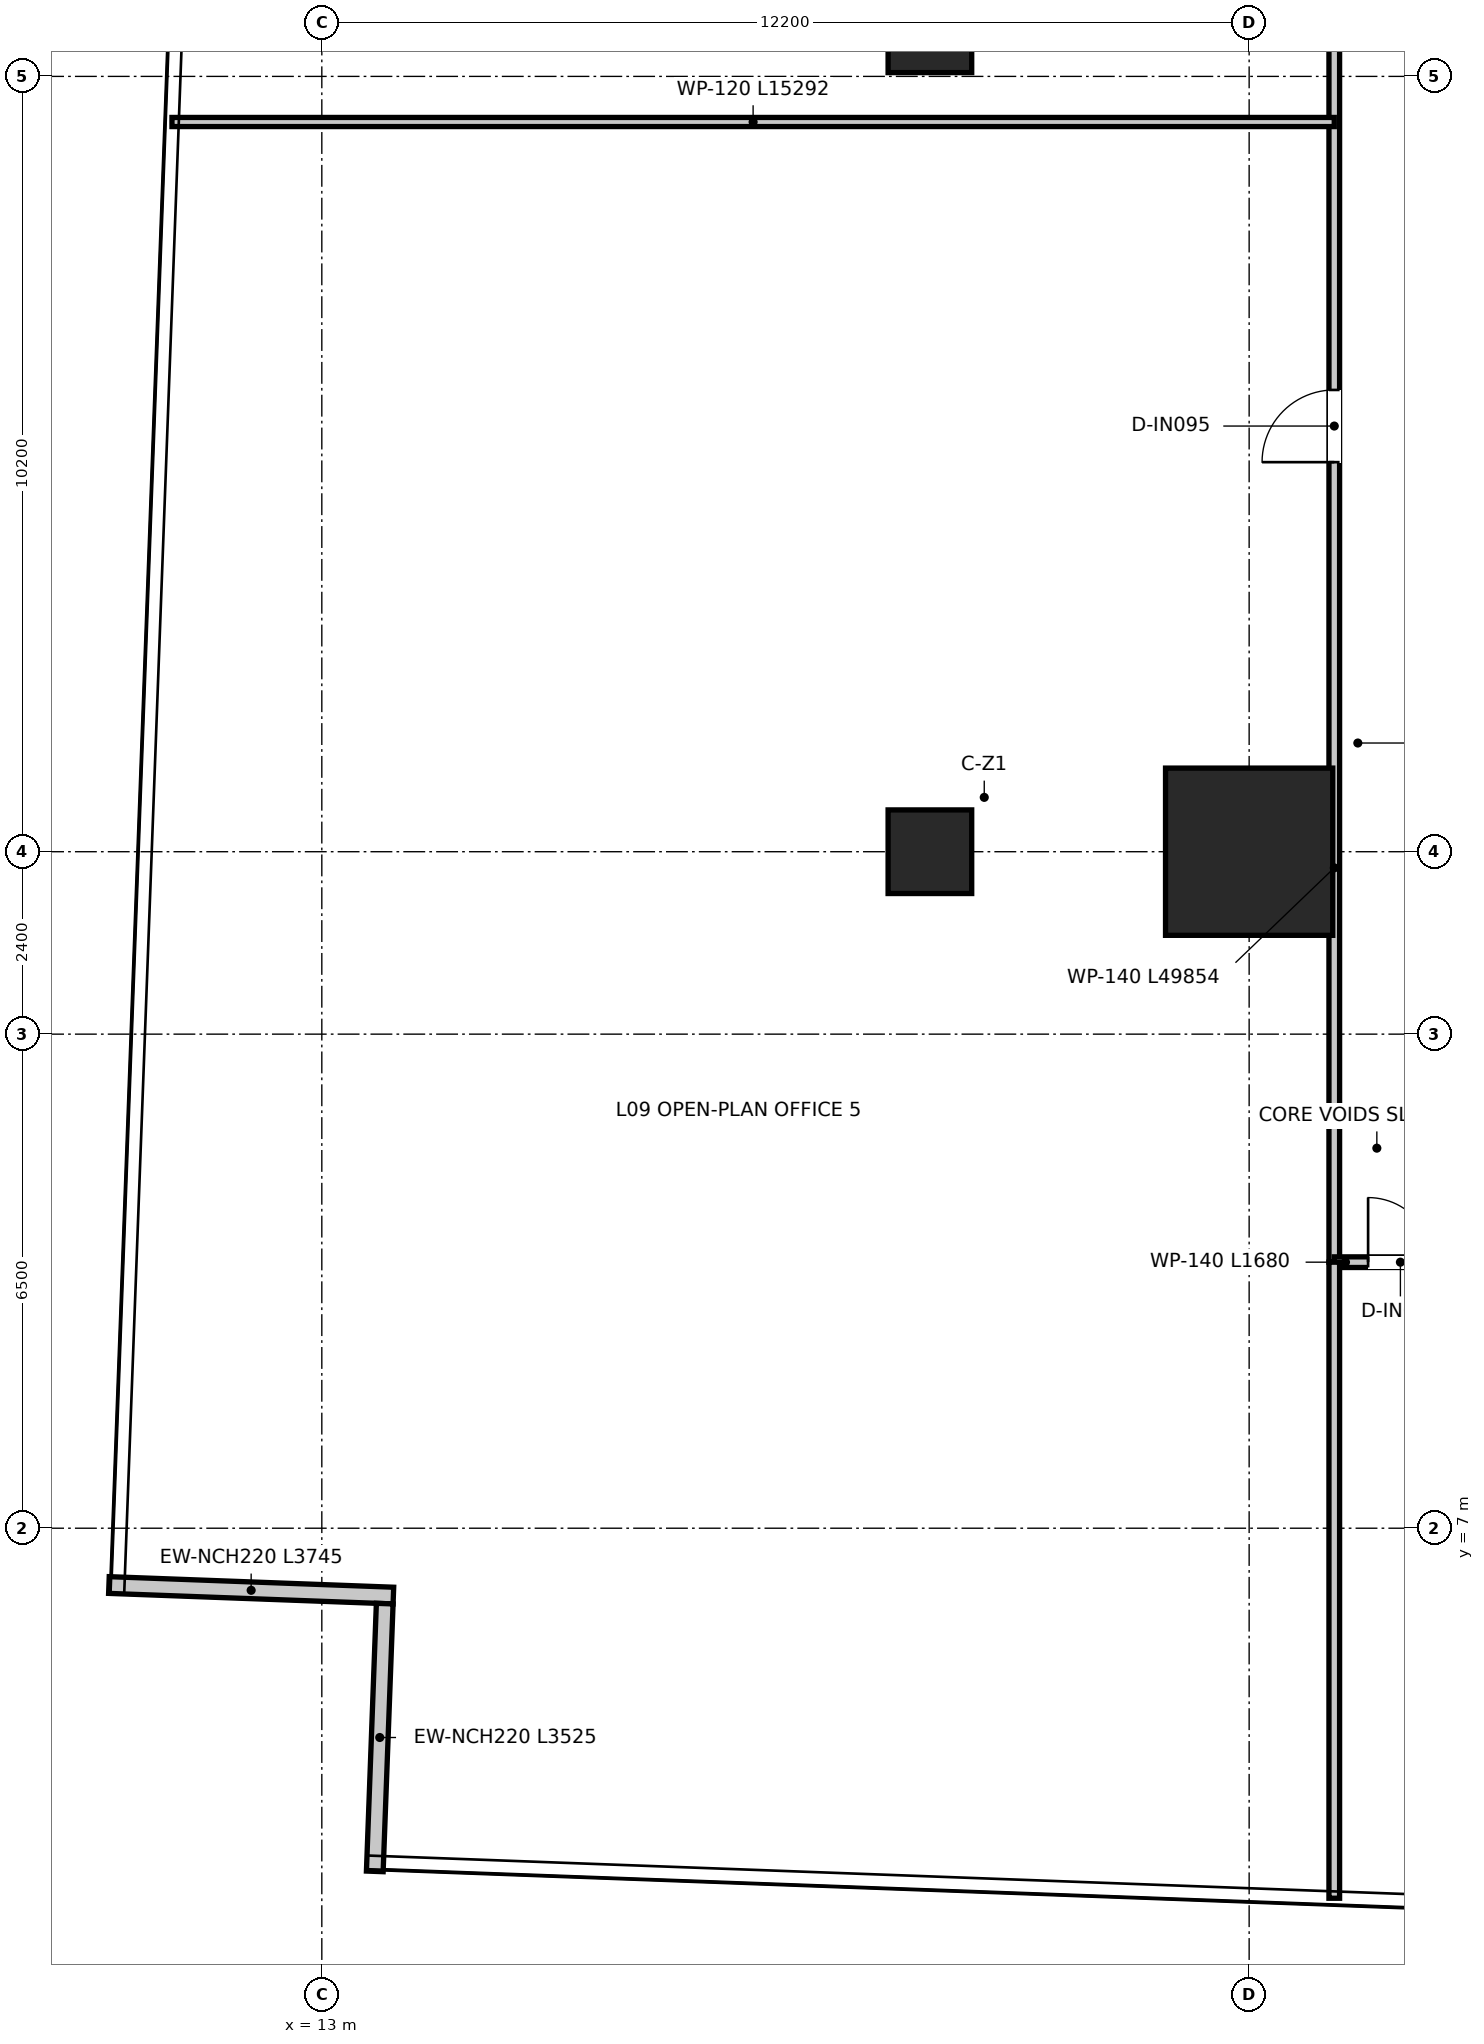
"""IFC4 building model, lengths in metres.
Left out: names, types, materials, properties, quantities, classifications, styles, units other than length and angle.
Written with IfcOpenShell. Run it as: python <this file> out.ifc"""

import sys

from ifc_helpers import new_model, si_unit, direction, frame, frame_2d, origin, origin_2d, place, context, subcontext, project, spatial, rectangle, extrude, source, transform, mapped, element, fill, save


model = new_model("IFC4")
c1 = context("Model", 3, precision=1e-05, world=origin(), true_north=direction((0.0, 1.0)))
c2 = subcontext(c1, "Body", "Model", "MODEL_VIEW")
j1 = project(units=[si_unit("LENGTHUNIT", "METRE"), si_unit("PLANEANGLEUNIT", "RADIAN")], contexts=[c1])
p1 = place(None, origin())
s1 = spatial("IfcSite", under=j1, at=p1, CompositionType="ELEMENT")
p2 = place(p1, origin())
s2 = spatial("IfcBuilding", under=s1, at=p2, CompositionType="ELEMENT")
p3 = place(p2, frame((0.0, 0.0, 40.8)))
s3 = spatial("IfcBuildingStorey", under=s2, at=p3, CompositionType="ELEMENT", Elevation=40.8)
m1 = source(origin(), c2, "Body", "SweptSolid", [
    extrude(rectangle(XDim=2.2, YDim=2.2, at=origin_2d()), origin(), (0.0, 0.0, 1.0), 3.95),
])
p4 = place(p3, frame((25.2, 15.9, 0.0), z_axis=(0.0, 0.0, 1.0), x_axis=(1.0, 0.0, 0.0)))
e1 = element("IfcColumn", 1, at=p4, inside=s3, PredefinedType="USERDEFINED", context=c2, shape_type="MappedRepresentation", body=[
    mapped(m1, transform((0.0, 0.0, 0.0), x_axis=(1.0, 0.0, 0.0), y_axis=(0.0, 1.0, 0.0), z_axis=(0.0, 0.0, 1.0), scale=1.0)),
])
m2 = source(origin(), c2, "Body", "SweptSolid", [
    extrude(rectangle(XDim=1.1, YDim=1.1, at=origin_2d()), origin(), (0.0, 0.0, 1.0), 3.95),
])
for number, where, z_axis, x_axis in (
    (2, (21.0, 15.9, 0.0), (0.0, 0.0, 1.0), (1.0, 0.0, 0.0)),
    (3, (21.0, 26.7, 0.0), (0.0, 0.0, 1.0), (1.0, 0.0, 0.0)),
):
    element("IfcColumn", number, at=place(p3, frame(where, z_axis=z_axis, x_axis=x_axis)), inside=s3, PredefinedType="COLUMN", context=c2, shape_type="MappedRepresentation", body=[
        mapped(m2, transform((0.0, 0.0, 0.0), x_axis=(1.0, 0.0, 0.0), y_axis=(0.0, 1.0, 0.0), z_axis=(0.0, 0.0, 1.0), scale=1.0)),
    ])
p5 = place(p3, frame((10.199, 6.253, 0.0), z_axis=(0.0, 0.0, 1.0), x_axis=(0.999311794114, -0.037093640215, 0.0)))
e4 = element("IfcWall", 4, at=p5, inside=s3, PredefinedType="ELEMENTEDWALL", context=c2, shape_type="SweptSolid", body=[
    extrude(rectangle(XDim=3.745, YDim=0.22, at=frame_2d((1.873, 0.0))), origin(), (0.0, 0.0, 1.0), 3.67),
])
p6 = place(p3, frame((13.827, 6.008, 0.0), z_axis=(0.0, 0.0, 1.0), x_axis=(-0.03705521019, -0.999313219865, 0.0)))
e5 = element("IfcWall", 5, at=p6, inside=s3, PredefinedType="ELEMENTEDWALL", context=c2, shape_type="SweptSolid", body=[
    extrude(rectangle(XDim=3.525, YDim=0.22, at=frame_2d((1.762, 0.0))), origin(), (0.0, 0.0, 1.0), 3.67),
])
p7 = place(p3, frame((26.32, 10.5, 0.0), z_axis=(0.0, 0.0, 1.0), x_axis=(0.0, 1.0, 0.0)))
e6 = element("IfcWall", 6, at=p7, inside=s3, PredefinedType="PARTITIONING", context=c2, shape_type="SweptSolid", body=[
    extrude(rectangle(XDim=25.62, YDim=0.14, at=frame_2d((12.81, 0.0))), origin(), (0.0, 0.0, 1.0), 2.97),
])
p8 = place(p7, frame((10.525, 0.0, 0.0)))
e7 = element("IfcOpeningElement", 7, at=p8, cuts=e6, PredefinedType="OPENING", context=c2, shape_type="SweptSolid", body=[
    extrude(rectangle(XDim=0.95, YDim=2.1, at=frame_2d((0.475, 1.05))), frame((0.0, 0.08, 0.0), z_axis=(0.0, -1.0, 0.0), x_axis=(1.0, 0.0, 0.0)), (0.0, 0.0, 1.0), 0.16),
])
p9 = place(p7, frame((19.125, 0.0, 0.0)))
e8 = element("IfcOpeningElement", 8, at=p9, cuts=e6, PredefinedType="OPENING", context=c2, shape_type="SweptSolid", body=[
    extrude(rectangle(XDim=0.95, YDim=2.1, at=frame_2d((0.475, 1.05))), frame((0.0, 0.08, 0.0), z_axis=(0.0, -1.0, 0.0), x_axis=(1.0, 0.0, 0.0)), (0.0, 0.0, 1.0), 0.16),
])
p10 = place(p3, frame((26.32, 10.5, 0.0), z_axis=(0.0, 0.0, 1.0), x_axis=(1.0, 0.0, 0.0)))
e9 = element("IfcWall", 9, at=p10, inside=s3, PredefinedType="PARTITIONING", context=c2, shape_type="SweptSolid", body=[
    extrude(rectangle(XDim=1.68, YDim=0.14, at=frame_2d((0.84, 0.0))), origin(), (0.0, 0.0, 1.0), 3.67),
])
p11 = place(p10, frame((0.445, 0.0, 0.0)))
e10 = element("IfcOpeningElement", 10, at=p11, cuts=e9, PredefinedType="OPENING", context=c2, shape_type="SweptSolid", body=[
    extrude(rectangle(XDim=0.85, YDim=2.1, at=frame_2d((0.425, 1.05))), frame((0.0, 0.08, 0.0), z_axis=(0.0, -1.0, 0.0), x_axis=(1.0, 0.0, 0.0)), (0.0, 0.0, 1.0), 0.16),
])
p12 = place(p3, frame((26.32, 2.132, 0.0), z_axis=(0.0, 0.0, 1.0), x_axis=(0.0, 1.0, 0.0)))
e11 = element("IfcWall", 11, at=p12, inside=s3, PredefinedType="PARTITIONING", context=c2, shape_type="SweptSolid", body=[
    extrude(rectangle(XDim=8.368, YDim=0.14, at=frame_2d((4.184, 0.0))), origin(), (0.0, 0.0, 1.0), 3.67),
])
p13 = place(p3, frame((11.028, 25.5, 0.0), z_axis=(0.0, 0.0, 1.0), x_axis=(1.0, 0.0, 0.0)))
e12 = element("IfcWall", 12, at=p13, inside=s3, PredefinedType="PARTITIONING", context=c2, shape_type="SweptSolid", body=[
    extrude(rectangle(XDim=15.292, YDim=0.12, at=frame_2d((7.646, 0.0))), origin(), (0.0, 0.0, 1.0), 2.97),
])
p14 = place(p8, origin())
e13 = element("IfcDoor", 13, at=p14, inside=s3, OperationType="SINGLE_SWING_LEFT", PredefinedType="DOOR", context=c2, shape_type="SweptSolid", body=[
    extrude(rectangle(XDim=0.95, YDim=2.1, at=frame_2d((0.475, 1.05))), frame((0.0, 0.025, 0.0), z_axis=(0.0, -1.0, 0.0), x_axis=(1.0, 0.0, 0.0)), (0.0, 0.0, 1.0), 0.05),
])
fill(e7, e13)
p15 = place(p11, origin())
e14 = element("IfcDoor", 14, at=p15, inside=s3, OperationType="SINGLE_SWING_LEFT", PredefinedType="DOOR", context=c2, shape_type="SweptSolid", body=[
    extrude(rectangle(XDim=0.85, YDim=2.1, at=frame_2d((0.425, 1.05))), frame((0.0, 0.025, 0.0), z_axis=(0.0, -1.0, 0.0), x_axis=(1.0, 0.0, 0.0)), (0.0, 0.0, 1.0), 0.05),
])
fill(e10, e14)
save(model, sys.argv[1])
